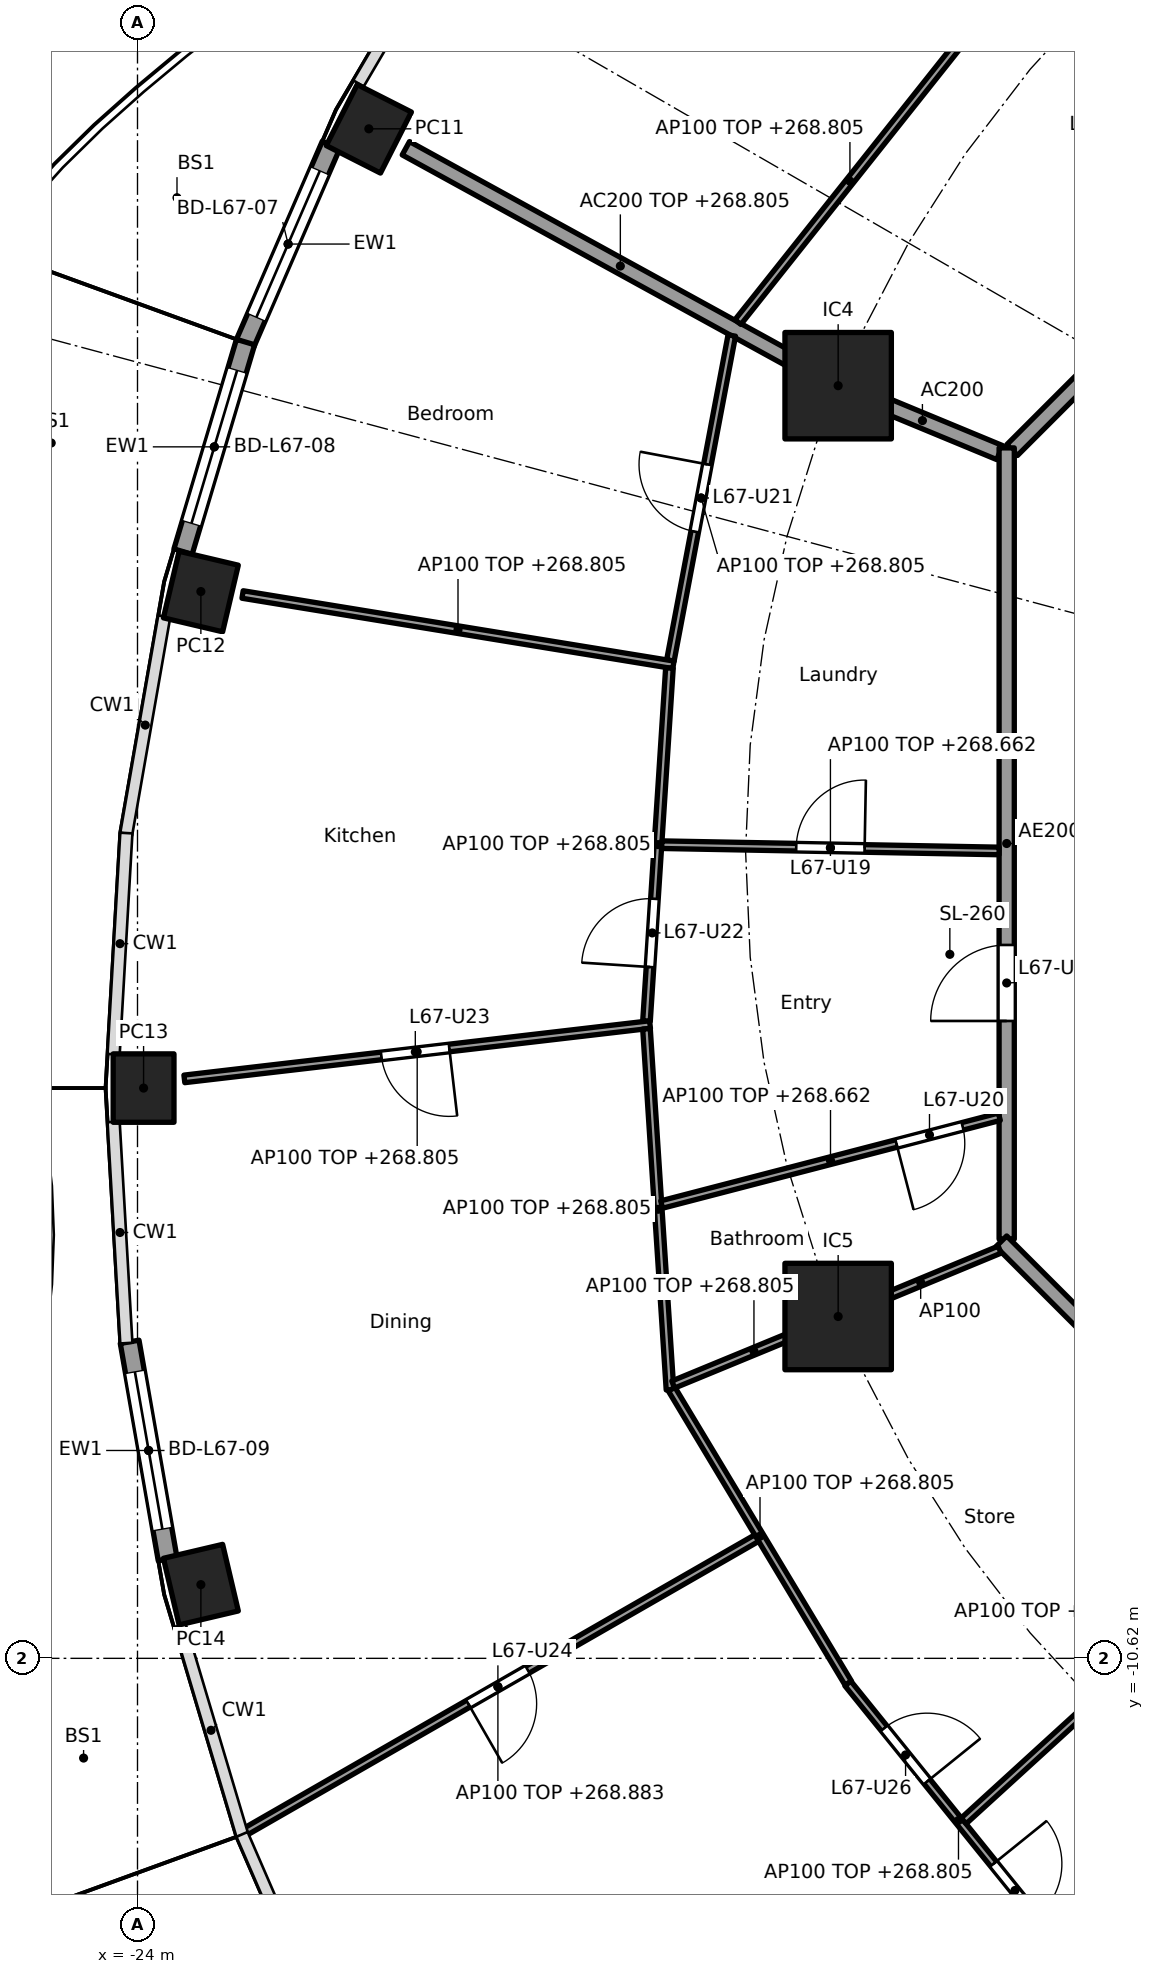
"""IFC4 building model, lengths in metres.
Left out: names, types, materials, properties, quantities, classifications, styles, units other than length and angle.
Written with IfcOpenShell. Run it as: python <this file> out.ifc"""

import sys

from ifc_helpers import new_model, si_unit, direction, frame, frame_2d, origin, origin_2d, place, context, subcontext, project, spatial, rectangle, hollow_rectangle, extrude, element, fill, save


model = new_model("IFC4")
c1 = context("Model", 3, precision=1e-05, world=origin(), true_north=direction((0.0, 1.0)))
c2 = subcontext(c1, "Body", "Model", "MODEL_VIEW")
j1 = project(units=[si_unit("LENGTHUNIT", "METRE"), si_unit("PLANEANGLEUNIT", "RADIAN")], contexts=[c1])
p1 = place(None, origin())
s1 = spatial("IfcSite", under=j1, at=p1, CompositionType="ELEMENT")
p2 = place(p1, origin())
s2 = spatial("IfcBuilding", under=s1, at=p2, CompositionType="ELEMENT")
p3 = place(p2, frame((0.0, 0.0, 265.9)))
s3 = spatial("IfcBuildingStorey", under=s2, at=p3, CompositionType="ELEMENT", Elevation=265.9)
for number, where, z_axis, x_axis in (
    (1, (-20.957, 9.502, 0.0), (0.0, 0.0, 1.0), (-0.452, -0.892, 0.0)),
    (2, (-23.166, 3.415, 0.0), (0.0, 0.0, 1.0), (-0.229, -0.973, 0.0)),
    (3, (-23.92, -3.118, 0.0), (0.0, 0.0, 1.0), (0.0, -1.0, 0.0)),
    (4, (-23.166, -9.65, 0.0), (0.0, 0.0, 1.0), (0.229, -0.973, 0.0)),
):
    element("IfcColumn", number, at=place(p3, frame(where, z_axis=z_axis, x_axis=x_axis)), inside=s3, PredefinedType="COLUMN", context=c2, shape_type="SweptSolid", body=[
        extrude(hollow_rectangle(XDim=0.9, YDim=0.8, WallThickness=0.028, at=origin_2d()), origin(), (0.0, 0.0, 1.0), 3.7),
    ])
for number, where, z_axis, x_axis in (
    (5, (-14.782, 6.123, 0.0), (0.0, 0.0, 1.0), (1.0, 0.0, 0.0)),
    (6, (-14.782, -6.123, 0.0), (0.0, 0.0, 1.0), (1.0, 0.0, 0.0)),
):
    element("IfcColumn", number, at=place(p3, frame(where, z_axis=z_axis, x_axis=x_axis)), inside=s3, PredefinedType="COLUMN", context=c2, shape_type="SweptSolid", body=[
        extrude(rectangle(XDim=1.4, YDim=1.4, at=origin_2d()), origin(), (0.0, 0.0, 1.0), 3.7),
    ])
p4 = place(p3, frame((-22.583, 6.683, 0.0), z_axis=(0.0, 0.0, 1.0), x_axis=(0.397597791596, 0.9175598052, 0.0)))
e7 = element("IfcWall", 7, at=p4, inside=s3, PredefinedType="SOLIDWALL", context=c2, shape_type="SweptSolid", body=[
    extrude(rectangle(XDim=2.841, YDim=0.25, at=frame_2d((1.42, 0.0))), origin(), (0.0, 0.0, 1.0), 3.44),
])
p5 = place(p4, frame((0.371, 0.0, 0.0)))
e8 = element("IfcOpeningElement", 8, at=p5, cuts=e7, PredefinedType="OPENING", context=c2, shape_type="SweptSolid", body=[
    extrude(rectangle(XDim=2.1, YDim=2.4, at=frame_2d((1.05, 1.2))), frame((0.0, 0.135, 0.0), z_axis=(0.0, -1.0, 0.0), x_axis=(1.0, 0.0, 0.0)), (0.0, 0.0, 1.0), 0.27),
])
p6 = place(p3, frame((-23.401, 3.94, 0.0), z_axis=(0.0, 0.0, 1.0), x_axis=(0.285876209024, 0.9582665564, 0.0)))
e9 = element("IfcWall", 9, at=p6, inside=s3, PredefinedType="SOLIDWALL", context=c2, shape_type="SweptSolid", body=[
    extrude(rectangle(XDim=2.877, YDim=0.25, at=frame_2d((1.438, 0.0))), origin(), (0.0, 0.0, 1.0), 3.44),
])
p7 = place(p6, frame((0.389, 0.0, 0.0)))
e10 = element("IfcOpeningElement", 10, at=p7, cuts=e9, PredefinedType="OPENING", context=c2, shape_type="SweptSolid", body=[
    extrude(rectangle(XDim=2.1, YDim=2.4, at=frame_2d((1.05, 1.2))), frame((0.0, 0.135, 0.0), z_axis=(0.0, -1.0, 0.0), x_axis=(1.0, 0.0, 0.0)), (0.0, 0.0, 1.0), 0.27),
])
p8 = place(p3, frame((-23.604, -9.315, 0.0), z_axis=(0.0, 0.0, 1.0), x_axis=(-0.172182411767, 0.985065082661, 0.0)))
e11 = element("IfcWall", 11, at=p8, inside=s3, PredefinedType="SOLIDWALL", context=c2, shape_type="SweptSolid", body=[
    extrude(rectangle(XDim=2.903, YDim=0.25, at=frame_2d((1.451, 0.0))), origin(), (0.0, 0.0, 1.0), 3.44),
])
p9 = place(p8, frame((0.401, 0.0, 0.0)))
e12 = element("IfcOpeningElement", 12, at=p9, cuts=e11, PredefinedType="OPENING", context=c2, shape_type="SweptSolid", body=[
    extrude(rectangle(XDim=2.1, YDim=2.4, at=frame_2d((1.05, 1.2))), frame((0.0, 0.135, 0.0), z_axis=(0.0, -1.0, 0.0), x_axis=(1.0, 0.0, 0.0)), (0.0, 0.0, 1.0), 0.27),
])
p10 = place(p3, frame((-12.657, 5.243, 0.0), z_axis=(0.0, 0.0, 1.0), x_axis=(-0.923869415315, 0.382707856524, 0.0)))
e13 = element("IfcWall", 13, at=p10, inside=s3, PredefinedType="PARTITIONING", context=c2, shape_type="SweptSolid", body=[
    extrude(rectangle(XDim=2.2, YDim=0.2, at=frame_2d((1.1, 0.0))), origin(), (0.0, 0.0, 1.0), 3.44),
])
p11 = place(p3, frame((-14.826, 6.147, 0.0), z_axis=(0.0, 0.0, 1.0), x_axis=(-0.876484755865, 0.481429613481, 0.0)))
e14 = element("IfcWall", 14, at=p11, inside=s3, PredefinedType="PARTITIONING", context=c2, shape_type="SweptSolid", body=[
    extrude(rectangle(XDim=6.439, YDim=0.2, at=frame_2d((3.219, 0.0))), origin(), (0.0, 0.0, 1.0), 2.905),
])
p12 = place(p3, frame((-5.275, 12.494, 0.0), z_axis=(0.0, 0.0, 1.0), x_axis=(-0.707106781187, -0.707106781187, 0.0)))
e15 = element("IfcWall", 15, at=p12, inside=s3, PredefinedType="PARTITIONING", context=c2, shape_type="SweptSolid", body=[
    extrude(rectangle(XDim=10.209, YDim=0.2, at=frame_2d((5.104, 0.0))), origin(), (0.0, 0.0, 1.0), 3.44),
])
p13 = place(p3, frame((-12.565, 5.304, 0.0), z_axis=(0.0, 0.0, 1.0), x_axis=(0.0, -1.0, 0.0)))
e16 = element("IfcWall", 16, at=p13, inside=s3, PredefinedType="PARTITIONING", context=c2, shape_type="SweptSolid", body=[
    extrude(rectangle(XDim=10.409, YDim=0.2, at=frame_2d((5.205, 0.0))), origin(), (0.0, 0.0, 1.0), 3.44),
])
p14 = place(p13, frame((6.539, 0.0, 0.0)))
e17 = element("IfcOpeningElement", 17, at=p14, cuts=e16, PredefinedType="OPENING", context=c2, shape_type="SweptSolid", body=[
    extrude(rectangle(XDim=1.0, YDim=2.1, at=frame_2d((0.5, 1.05))), frame((0.0, 0.11, 0.0), z_axis=(0.0, -1.0, 0.0), x_axis=(1.0, 0.0, 0.0)), (0.0, 0.0, 1.0), 0.22),
])
p15 = place(p3, frame((-12.635, -5.134, 0.0), z_axis=(0.0, 0.0, 1.0), x_axis=(0.707106781187, -0.707106781187, 0.0)))
e18 = element("IfcWall", 18, at=p15, inside=s3, PredefinedType="PARTITIONING", context=c2, shape_type="SweptSolid", body=[
    extrude(rectangle(XDim=10.609, YDim=0.2, at=frame_2d((5.305, 0.0))), origin(), (0.0, 0.0, 1.0), 3.44),
])
p16 = place(p3, frame((-13.154, 10.667, 0.0), z_axis=(0.0, 0.0, 1.0), x_axis=(-0.622246555556, -0.782821323227, 0.0)))
e19 = element("IfcWall", 19, at=p16, inside=s3, PredefinedType="PARTITIONING", context=c2, shape_type="SweptSolid", body=[
    extrude(rectangle(XDim=4.736, YDim=0.1, at=frame_2d((2.368, 0.0))), origin(), (0.0, 0.0, 1.0), 2.905),
])
p17 = place(p3, frame((-16.181, 6.783, 0.0), z_axis=(0.0, 0.0, 1.0), x_axis=(-0.185670583745, -0.982612046706, 0.0)))
e20 = element("IfcWall", 20, at=p17, inside=s3, PredefinedType="PARTITIONING", context=c2, shape_type="SweptSolid", body=[
    extrude(rectangle(XDim=4.351, YDim=0.1, at=frame_2d((2.176, 0.0))), origin(), (0.0, 0.0, 1.0), 2.905),
])
p18 = place(p17, frame((1.726, 0.0, 0.0)))
e21 = element("IfcOpeningElement", 21, at=p18, cuts=e20, PredefinedType="OPENING", context=c2, shape_type="SweptSolid", body=[
    extrude(rectangle(XDim=0.9, YDim=2.1, at=frame_2d((0.45, 1.05))), frame((0.0, 0.06, 0.0), z_axis=(0.0, -1.0, 0.0), x_axis=(1.0, 0.0, 0.0)), (0.0, 0.0, 1.0), 0.12),
])
p19 = place(p3, frame((-16.949, 2.451, 0.0), z_axis=(0.0, 0.0, 1.0), x_axis=(-0.986937570833, 0.161103169673, 0.0)))
e22 = element("IfcWall", 22, at=p19, inside=s3, PredefinedType="PARTITIONING", context=c2, shape_type="SweptSolid", body=[
    extrude(rectangle(XDim=5.743, YDim=0.1, at=frame_2d((2.872, 0.0))), origin(), (0.0, 0.0, 1.0), 2.905),
])
p20 = place(p3, frame((-17.002, 2.409, 0.0), z_axis=(0.0, 0.0, 1.0), x_axis=(-0.064855550758, -0.997894662545, 0.0)))
e23 = element("IfcWall", 23, at=p20, inside=s3, PredefinedType="PARTITIONING", context=c2, shape_type="SweptSolid", body=[
    extrude(rectangle(XDim=4.656, YDim=0.1, at=frame_2d((2.328, 0.0))), origin(), (0.0, 0.0, 1.0), 2.905),
])
p21 = place(p20, frame((3.042, 0.0, 0.0)))
e24 = element("IfcOpeningElement", 24, at=p21, cuts=e23, PredefinedType="OPENING", context=c2, shape_type="SweptSolid", body=[
    extrude(rectangle(XDim=0.9, YDim=2.1, at=frame_2d((0.45, 1.05))), frame((0.0, 0.06, 0.0), z_axis=(0.0, -1.0, 0.0), x_axis=(1.0, 0.0, 0.0)), (0.0, 0.0, 1.0), 0.12),
])
p22 = place(p3, frame((-12.665, 0.002, 0.0), z_axis=(0.0, 0.0, 1.0), x_axis=(-0.999827178165, 0.018590691287, 0.0)))
e25 = element("IfcWall", 25, at=p22, inside=s3, PredefinedType="PARTITIONING", context=c2, shape_type="SweptSolid", body=[
    extrude(rectangle(XDim=4.439, YDim=0.1, at=frame_2d((2.219, 0.0))), origin(), (0.0, 0.0, 1.0), 2.762),
])
p23 = place(p22, frame((1.769, 0.0, 0.0)))
e26 = element("IfcOpeningElement", 26, at=p23, cuts=e25, PredefinedType="OPENING", context=c2, shape_type="SweptSolid", body=[
    extrude(rectangle(XDim=0.9, YDim=2.1, at=frame_2d((0.45, 1.05))), frame((0.0, 0.06, 0.0), z_axis=(0.0, -1.0, 0.0), x_axis=(1.0, 0.0, 0.0)), (0.0, 0.0, 1.0), 0.12),
])
p24 = place(p3, frame((-17.257, -2.282, 0.0), z_axis=(0.0, 0.0, 1.0), x_axis=(-0.993266024162, -0.11585596767, 0.0)))
e27 = element("IfcWall", 27, at=p24, inside=s3, PredefinedType="PARTITIONING", context=c2, shape_type="SweptSolid", body=[
    extrude(rectangle(XDim=6.168, YDim=0.1, at=frame_2d((3.084, 0.0))), origin(), (0.0, 0.0, 1.0), 2.905),
])
p25 = place(p24, frame((2.659, 0.0, 0.0)))
e28 = element("IfcOpeningElement", 28, at=p25, cuts=e27, PredefinedType="OPENING", context=c2, shape_type="SweptSolid", body=[
    extrude(rectangle(XDim=0.9, YDim=2.1, at=frame_2d((0.45, 1.05))), frame((0.0, 0.06, 0.0), z_axis=(0.0, -1.0, 0.0), x_axis=(1.0, 0.0, 0.0)), (0.0, 0.0, 1.0), 0.12),
])
p26 = place(p3, frame((-17.304, -2.338, 0.0), z_axis=(0.0, 0.0, 1.0), x_axis=(0.065003615989, -0.997885028402, 0.0)))
e29 = element("IfcWall", 29, at=p26, inside=s3, PredefinedType="PARTITIONING", context=c2, shape_type="SweptSolid", body=[
    extrude(rectangle(XDim=4.759, YDim=0.1, at=frame_2d((2.379, 0.0))), origin(), (0.0, 0.0, 1.0), 2.905),
])
p27 = place(p3, frame((-12.662, -3.495, 0.0), z_axis=(0.0, 0.0, 1.0), x_axis=(-0.967834941053, -0.251586022817, 0.0)))
e30 = element("IfcWall", 30, at=p27, inside=s3, PredefinedType="PARTITIONING", context=c2, shape_type="SweptSolid", body=[
    extrude(rectangle(XDim=4.59, YDim=0.1, at=frame_2d((2.295, 0.0))), origin(), (0.0, 0.0, 1.0), 2.762),
])
p28 = place(p27, frame((0.5, 0.0, 0.0)))
e31 = element("IfcOpeningElement", 31, at=p28, cuts=e30, PredefinedType="OPENING", context=c2, shape_type="SweptSolid", body=[
    extrude(rectangle(XDim=0.9, YDim=2.1, at=frame_2d((0.45, 1.05))), frame((0.0, 0.06, 0.0), z_axis=(0.0, -1.0, 0.0), x_axis=(1.0, 0.0, 0.0)), (0.0, 0.0, 1.0), 0.12),
])
p29 = place(p3, frame((-12.657, -5.243, 0.0), z_axis=(0.0, 0.0, 1.0), x_axis=(-0.923864733477, -0.382719158442, 0.0)))
e32 = element("IfcWall", 32, at=p29, inside=s3, PredefinedType="PARTITIONING", context=c2, shape_type="SweptSolid", body=[
    extrude(rectangle(XDim=2.25, YDim=0.1, at=frame_2d((1.125, 0.0))), origin(), (0.0, 0.0, 1.0), 3.44),
])
p30 = place(p3, frame((-14.828, -6.142, 0.0), z_axis=(0.0, 0.0, 1.0), x_axis=(-0.924479819749, -0.381230983627, 0.0)))
e33 = element("IfcWall", 33, at=p30, inside=s3, PredefinedType="PARTITIONING", context=c2, shape_type="SweptSolid", body=[
    extrude(rectangle(XDim=2.296, YDim=0.1, at=frame_2d((1.148, 0.0))), origin(), (0.0, 0.0, 1.0), 2.905),
])
p31 = place(p3, frame((-16.972, -7.08, 0.0), z_axis=(0.0, 0.0, 1.0), x_axis=(0.514989049311, -0.857196756346, 0.0)))
e34 = element("IfcWall", 34, at=p31, inside=s3, PredefinedType="PARTITIONING", context=c2, shape_type="SweptSolid", body=[
    extrude(rectangle(XDim=4.512, YDim=0.1, at=frame_2d((2.256, 0.0))), origin(), (0.0, 0.0, 1.0), 2.905),
])
p32 = place(p3, frame((-15.854, -9.038, 0.0), z_axis=(0.0, 0.0, 1.0), x_axis=(-0.867229230904, -0.497909089157, 0.0)))
e35 = element("IfcWall", 35, at=p32, inside=s3, PredefinedType="PARTITIONING", context=c2, shape_type="SweptSolid", body=[
    extrude(rectangle(XDim=7.853, YDim=0.1, at=frame_2d((3.926, 0.0))), origin(), (0.0, 0.0, 1.0), 2.983),
])
p33 = place(p32, frame((3.476, 0.0, 0.0)))
e36 = element("IfcOpeningElement", 36, at=p33, cuts=e35, PredefinedType="OPENING", context=c2, shape_type="SweptSolid", body=[
    extrude(rectangle(XDim=0.9, YDim=2.1, at=frame_2d((0.45, 1.05))), frame((0.0, 0.06, 0.0), z_axis=(0.0, -1.0, 0.0), x_axis=(1.0, 0.0, 0.0)), (0.0, 0.0, 1.0), 0.12),
])
p34 = place(p3, frame((-14.654, -10.951, 0.0), z_axis=(0.0, 0.0, 1.0), x_axis=(0.62815308134, -0.778089780426, 0.0)))
e37 = element("IfcWall", 37, at=p34, inside=s3, PredefinedType="PARTITIONING", context=c2, shape_type="SweptSolid", body=[
    extrude(rectangle(XDim=4.633, YDim=0.1, at=frame_2d((2.316, 0.0))), origin(), (0.0, 0.0, 1.0), 2.905),
])
p35 = place(p34, frame((0.758, 0.0, 0.0)))
e38 = element("IfcOpeningElement", 38, at=p35, cuts=e37, PredefinedType="OPENING", context=c2, shape_type="SweptSolid", body=[
    extrude(rectangle(XDim=0.9, YDim=2.1, at=frame_2d((0.45, 1.05))), frame((0.0, 0.06, 0.0), z_axis=(0.0, -1.0, 0.0), x_axis=(1.0, 0.0, 0.0)), (0.0, 0.0, 1.0), 0.12),
])
p36 = place(p34, frame((3.049, 0.0, 0.0)))
e39 = element("IfcOpeningElement", 39, at=p36, cuts=e37, PredefinedType="OPENING", context=c2, shape_type="SweptSolid", body=[
    extrude(rectangle(XDim=0.9, YDim=2.1, at=frame_2d((0.45, 1.05))), frame((0.0, 0.06, 0.0), z_axis=(0.0, -1.0, 0.0), x_axis=(1.0, 0.0, 0.0)), (0.0, 0.0, 1.0), 0.12),
])
p37 = place(p3, frame((-8.958, -8.952, 0.0), z_axis=(0.0, 0.0, 1.0), x_axis=(-0.73876526954, -0.673962815385, 0.0)))
e40 = element("IfcWall", 40, at=p37, inside=s3, PredefinedType="PARTITIONING", context=c2, shape_type="SweptSolid", body=[
    extrude(rectangle(XDim=5.647, YDim=0.1, at=frame_2d((2.824, 0.0))), origin(), (0.0, 0.0, 1.0), 2.762),
])
p38 = place(p5, origin())
e41 = element("IfcDoor", 41, at=p38, inside=s3, OperationType="SLIDING_TO_LEFT", PredefinedType="DOOR", context=c2, shape_type="SweptSolid", body=[
    extrude(rectangle(XDim=2.1, YDim=2.4, at=frame_2d((1.05, 1.2))), frame((0.0, 0.025, 0.0), z_axis=(0.0, -1.0, 0.0), x_axis=(1.0, 0.0, 0.0)), (0.0, 0.0, 1.0), 0.05),
])
fill(e8, e41)
p39 = place(p7, origin())
e42 = element("IfcDoor", 42, at=p39, inside=s3, OperationType="SLIDING_TO_LEFT", PredefinedType="DOOR", context=c2, shape_type="SweptSolid", body=[
    extrude(rectangle(XDim=2.1, YDim=2.4, at=frame_2d((1.05, 1.2))), frame((0.0, 0.025, 0.0), z_axis=(0.0, -1.0, 0.0), x_axis=(1.0, 0.0, 0.0)), (0.0, 0.0, 1.0), 0.05),
])
fill(e10, e42)
p40 = place(p9, origin())
e43 = element("IfcDoor", 43, at=p40, inside=s3, OperationType="SLIDING_TO_LEFT", PredefinedType="DOOR", context=c2, shape_type="SweptSolid", body=[
    extrude(rectangle(XDim=2.1, YDim=2.4, at=frame_2d((1.05, 1.2))), frame((0.0, 0.025, 0.0), z_axis=(0.0, -1.0, 0.0), x_axis=(1.0, 0.0, 0.0)), (0.0, 0.0, 1.0), 0.05),
])
fill(e12, e43)
p41 = place(p14, frame((1.0, 0.0, 0.0), x_axis=(-1.0, 0.0, 0.0)))
e44 = element("IfcDoor", 44, at=p41, inside=s3, OperationType="SINGLE_SWING_LEFT", PredefinedType="DOOR", context=c2, shape_type="SweptSolid", body=[
    extrude(rectangle(XDim=1.0, YDim=2.1, at=frame_2d((0.5, 1.05))), frame((0.0, 0.025, 0.0), z_axis=(0.0, -1.0, 0.0), x_axis=(1.0, 0.0, 0.0)), (0.0, 0.0, 1.0), 0.05),
])
fill(e17, e44)
p42 = place(p23, frame((0.9, 0.0, 0.0), x_axis=(-1.0, 0.0, 0.0)))
e45 = element("IfcDoor", 45, at=p42, inside=s3, OperationType="SINGLE_SWING_RIGHT", PredefinedType="DOOR", context=c2, shape_type="SweptSolid", body=[
    extrude(rectangle(XDim=0.9, YDim=2.1, at=frame_2d((0.45, 1.05))), frame((0.0, 0.025, 0.0), z_axis=(0.0, -1.0, 0.0), x_axis=(1.0, 0.0, 0.0)), (0.0, 0.0, 1.0), 0.05),
])
fill(e26, e45)
p43 = place(p28, origin())
e46 = element("IfcDoor", 46, at=p43, inside=s3, OperationType="SINGLE_SWING_RIGHT", PredefinedType="DOOR", context=c2, shape_type="SweptSolid", body=[
    extrude(rectangle(XDim=0.9, YDim=2.1, at=frame_2d((0.45, 1.05))), frame((0.0, 0.025, 0.0), z_axis=(0.0, -1.0, 0.0), x_axis=(1.0, 0.0, 0.0)), (0.0, 0.0, 1.0), 0.05),
])
fill(e31, e46)
p44 = place(p18, frame((0.9, 0.0, 0.0), x_axis=(-1.0, 0.0, 0.0)))
e47 = element("IfcDoor", 47, at=p44, inside=s3, OperationType="SINGLE_SWING_RIGHT", PredefinedType="DOOR", context=c2, shape_type="SweptSolid", body=[
    extrude(rectangle(XDim=0.9, YDim=2.1, at=frame_2d((0.45, 1.05))), frame((0.0, 0.025, 0.0), z_axis=(0.0, -1.0, 0.0), x_axis=(1.0, 0.0, 0.0)), (0.0, 0.0, 1.0), 0.05),
])
fill(e21, e47)
p45 = place(p21, frame((0.9, 0.0, 0.0), x_axis=(-1.0, 0.0, 0.0)))
e48 = element("IfcDoor", 48, at=p45, inside=s3, OperationType="SINGLE_SWING_LEFT", PredefinedType="DOOR", context=c2, shape_type="SweptSolid", body=[
    extrude(rectangle(XDim=0.9, YDim=2.1, at=frame_2d((0.45, 1.05))), frame((0.0, 0.025, 0.0), z_axis=(0.0, -1.0, 0.0), x_axis=(1.0, 0.0, 0.0)), (0.0, 0.0, 1.0), 0.05),
])
fill(e24, e48)
p46 = place(p25, origin())
e49 = element("IfcDoor", 49, at=p46, inside=s3, OperationType="SINGLE_SWING_LEFT", PredefinedType="DOOR", context=c2, shape_type="SweptSolid", body=[
    extrude(rectangle(XDim=0.9, YDim=2.1, at=frame_2d((0.45, 1.05))), frame((0.0, 0.025, 0.0), z_axis=(0.0, -1.0, 0.0), x_axis=(1.0, 0.0, 0.0)), (0.0, 0.0, 1.0), 0.05),
])
fill(e28, e49)
p47 = place(p33, origin())
e50 = element("IfcDoor", 50, at=p47, inside=s3, OperationType="SINGLE_SWING_RIGHT", PredefinedType="DOOR", context=c2, shape_type="SweptSolid", body=[
    extrude(rectangle(XDim=0.9, YDim=2.1, at=frame_2d((0.45, 1.05))), frame((0.0, 0.025, 0.0), z_axis=(0.0, -1.0, 0.0), x_axis=(1.0, 0.0, 0.0)), (0.0, 0.0, 1.0), 0.05),
])
fill(e36, e50)
p48 = place(p35, origin())
e51 = element("IfcDoor", 51, at=p48, inside=s3, OperationType="SINGLE_SWING_RIGHT", PredefinedType="DOOR", context=c2, shape_type="SweptSolid", body=[
    extrude(rectangle(XDim=0.9, YDim=2.1, at=frame_2d((0.45, 1.05))), frame((0.0, 0.025, 0.0), z_axis=(0.0, -1.0, 0.0), x_axis=(1.0, 0.0, 0.0)), (0.0, 0.0, 1.0), 0.05),
])
fill(e38, e51)
p49 = place(p36, origin())
e52 = element("IfcDoor", 52, at=p49, inside=s3, OperationType="SINGLE_SWING_LEFT", PredefinedType="DOOR", context=c2, shape_type="SweptSolid", body=[
    extrude(rectangle(XDim=0.9, YDim=2.1, at=frame_2d((0.45, 1.05))), frame((0.0, 0.025, 0.0), z_axis=(0.0, -1.0, 0.0), x_axis=(1.0, 0.0, 0.0)), (0.0, 0.0, 1.0), 0.05),
])
fill(e39, e52)
save(model, sys.argv[1])
